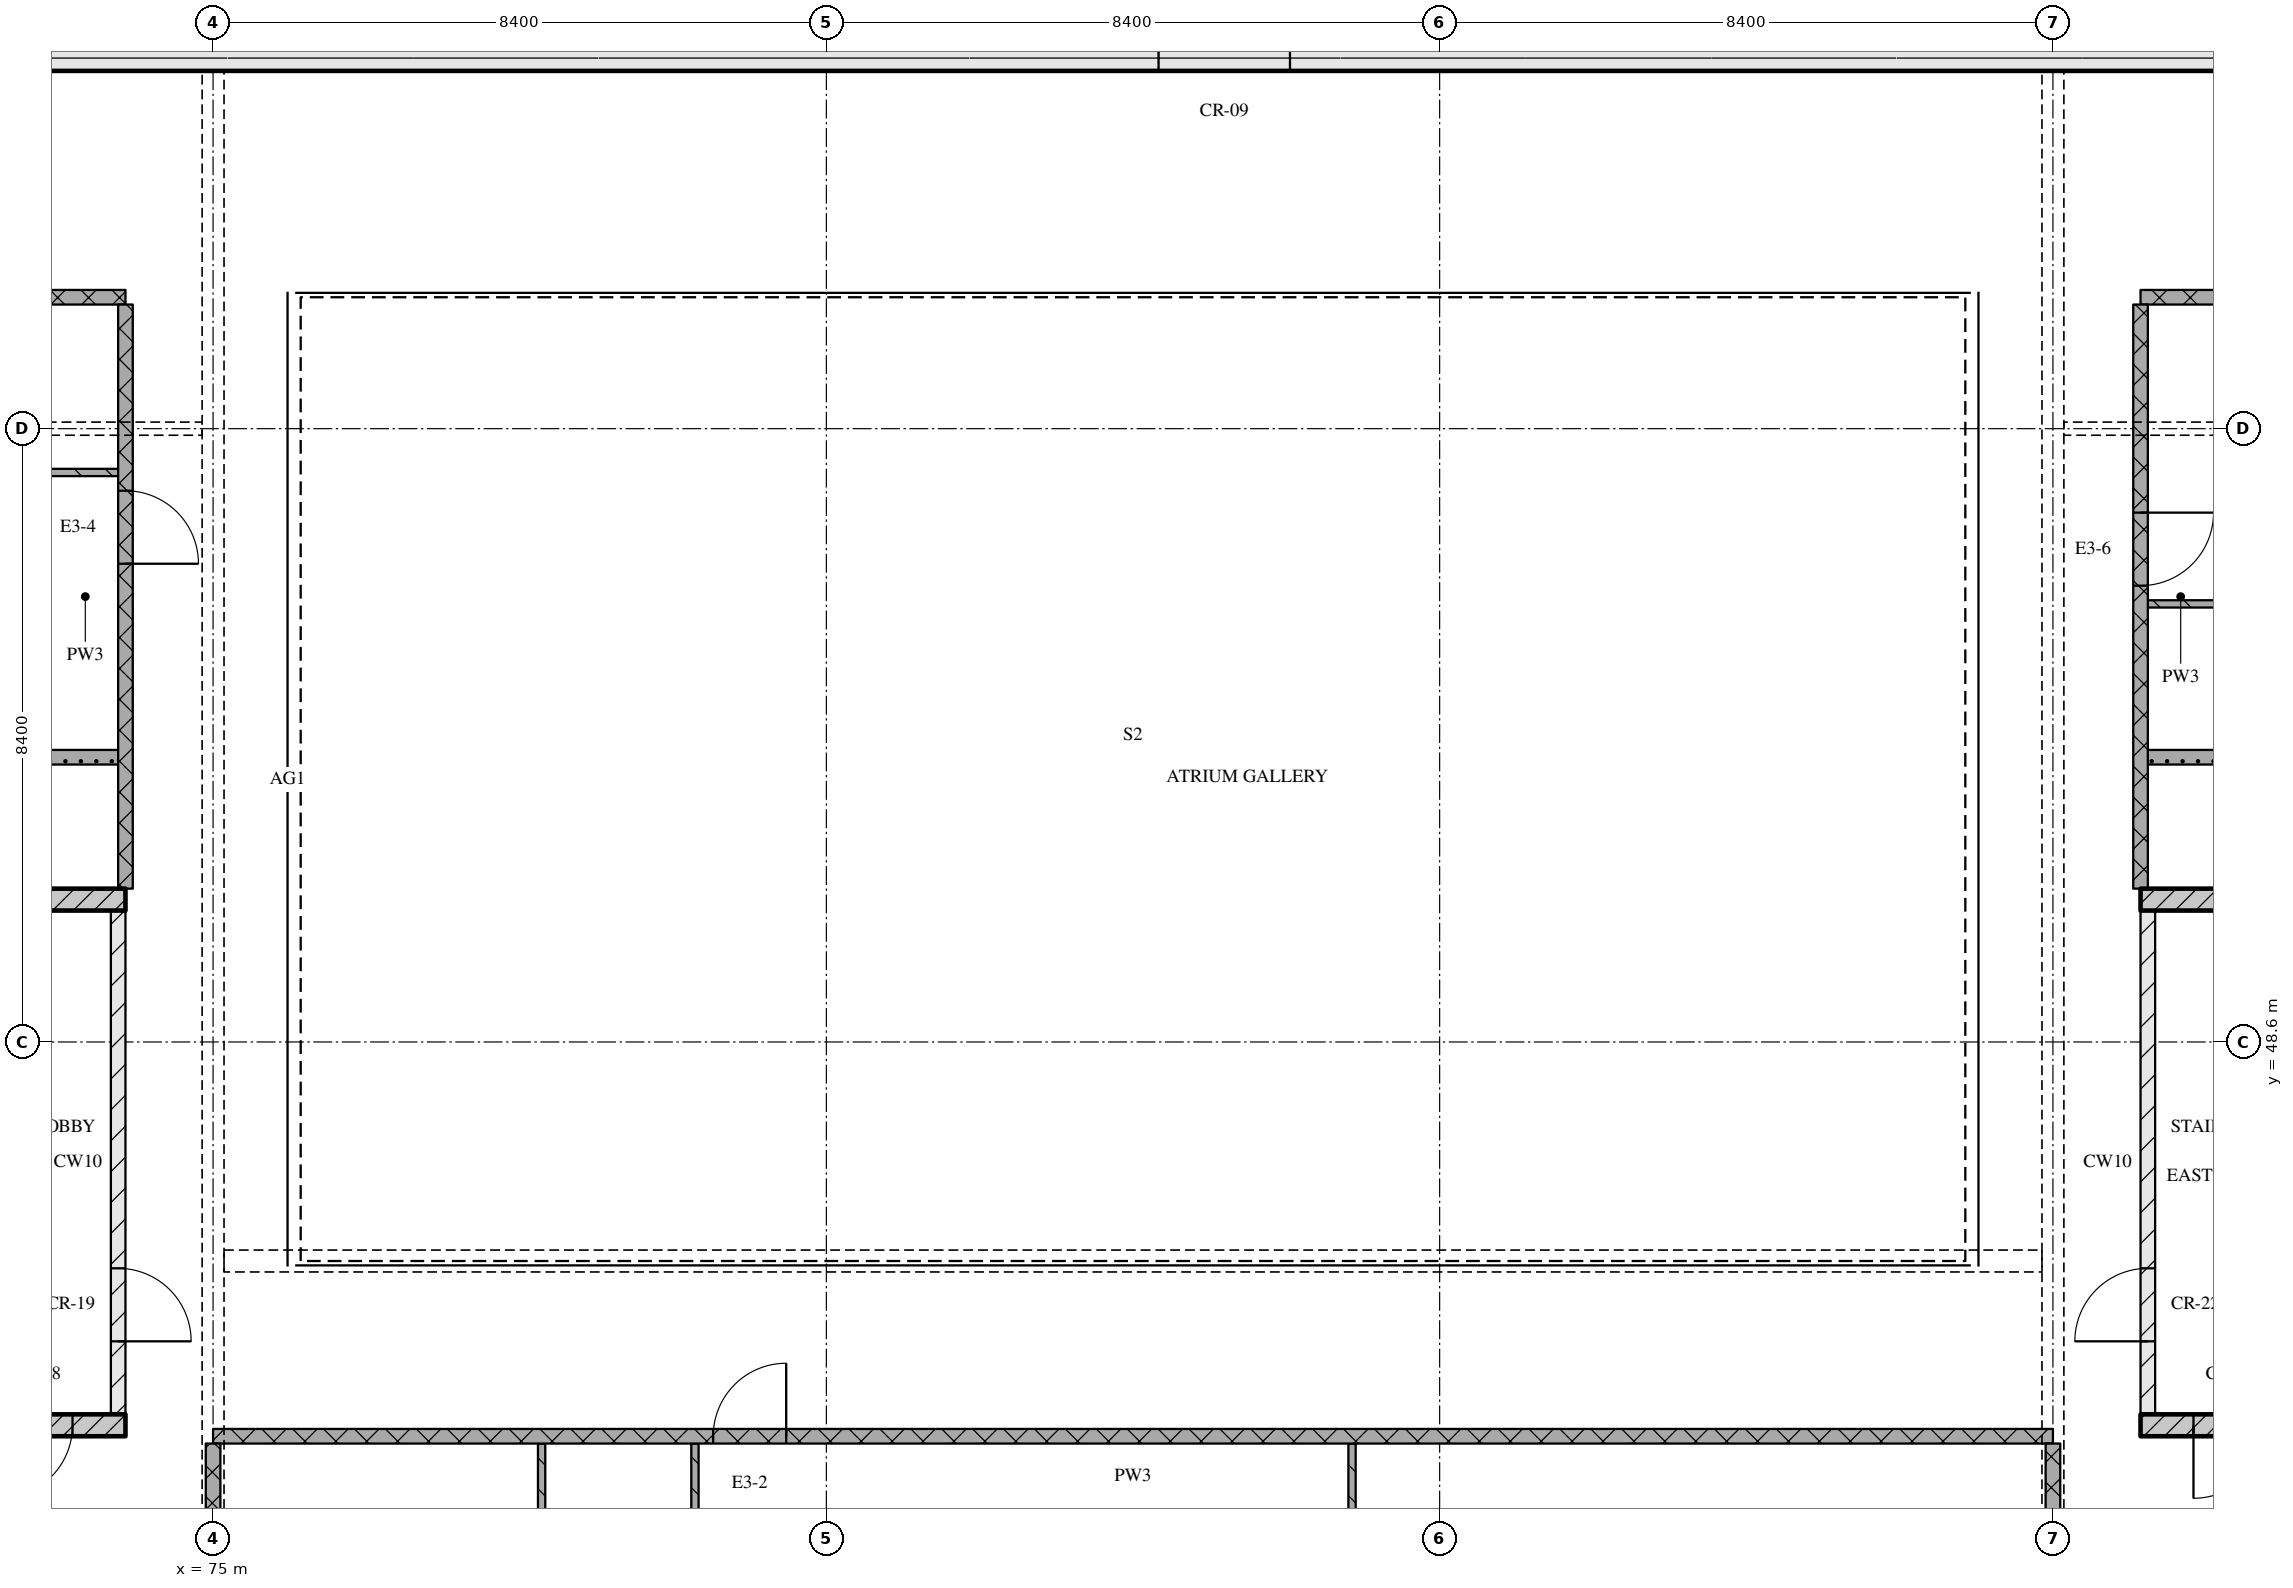
"""IFC4 building model, lengths in metres.
Left out: names, types, materials, properties, quantities, classifications, styles, units other than length and angle.
Written with IfcOpenShell. Run it as: python <this file> out.ifc"""

import sys

from ifc_helpers import new_model, si_unit, direction, frame, frame_2d, origin, place, context, subcontext, project, spatial, rectangle, extrude, element, fill, save


model = new_model("IFC4")
c1 = context("Model", 3, precision=1e-05, world=origin(), true_north=direction((0.0, 1.0)))
c2 = subcontext(c1, "Body", "Model", "MODEL_VIEW")
j1 = project(units=[si_unit("LENGTHUNIT", "METRE"), si_unit("PLANEANGLEUNIT", "RADIAN")], contexts=[c1])
p1 = place(None, origin())
s1 = spatial("IfcSite", under=j1, at=p1, CompositionType="ELEMENT")
p2 = place(p1, origin())
s2 = spatial("IfcBuilding", under=s1, at=p2, CompositionType="ELEMENT")
p3 = place(p2, frame((0.0, 0.0, 281.55)))
s3 = spatial("IfcBuildingStorey", under=s2, at=p3, CompositionType="ELEMENT", Elevation=281.55)
p4 = place(p3, frame((67.3, 62.15, 0.0), z_axis=(0.0, 0.0, 1.0), x_axis=(1.0, 0.0, 0.0)))
e1 = element("IfcWall", 1, at=p4, inside=s3, PredefinedType="SOLIDWALL", context=c2, shape_type="SweptSolid", body=[
    extrude(rectangle(XDim=40.6, YDim=0.5, at=frame_2d((20.3, 0.0))), origin(), (0.0, 0.0, 1.0), 3.32),
])
p5 = place(p4, frame((20.65, 0.0, 0.0)))
e2 = element("IfcOpeningElement", 2, at=p5, cuts=e1, PredefinedType="OPENING", context=c2, shape_type="SweptSolid", body=[
    extrude(rectangle(XDim=1.8, YDim=2.1, at=frame_2d((0.9, 1.05))), frame((0.0, 0.26, 0.0), z_axis=(0.0, -1.0, 0.0), x_axis=(1.0, 0.0, 0.0)), (0.0, 0.0, 1.0), 0.52),
])
p6 = place(p3, frame((68.2, 43.35, 0.0), z_axis=(0.0, 0.0, 1.0), x_axis=(1.0, 0.0, 0.0)))
e3 = element("IfcWall", 3, at=p6, inside=s3, PredefinedType="SOLIDWALL", context=c2, shape_type="SweptSolid", body=[
    extrude(rectangle(XDim=5.6, YDim=0.3, at=frame_2d((2.8, 0.0))), origin(), (0.0, 0.0, 1.0), 3.32),
])
p7 = place(p6, frame((3.875, 0.0, 0.0)))
e4 = element("IfcOpeningElement", 4, at=p7, cuts=e3, PredefinedType="OPENING", context=c2, shape_type="SweptSolid", body=[
    extrude(rectangle(XDim=1.0, YDim=2.1, at=frame_2d((0.5, 1.05))), frame((0.0, 0.16, 0.0), z_axis=(0.0, -1.0, 0.0), x_axis=(1.0, 0.0, 0.0)), (0.0, 0.0, 1.0), 0.32),
])
p8 = place(p3, frame((73.7, 43.5, 0.0), z_axis=(0.0, 0.0, 1.0), x_axis=(0.0, 1.0, 0.0)))
e5 = element("IfcWall", 5, at=p8, inside=s3, PredefinedType="PARTITIONING", context=c2, shape_type="SweptSolid", body=[
    extrude(rectangle(XDim=6.9, YDim=0.2, at=frame_2d((3.45, 0.0))), origin(), (0.0, 0.0, 1.0), 3.32),
])
p9 = place(p8, frame((1.0, 0.0, 0.0)))
e6 = element("IfcOpeningElement", 6, at=p9, cuts=e5, PredefinedType="OPENING", context=c2, shape_type="SweptSolid", body=[
    extrude(rectangle(XDim=1.0, YDim=2.1, at=frame_2d((0.5, 1.05))), frame((0.0, 0.11, 0.0), z_axis=(0.0, -1.0, 0.0), x_axis=(1.0, 0.0, 0.0)), (0.0, 0.0, 1.0), 0.22),
])
p10 = place(p3, frame((68.2, 50.55, 0.0), z_axis=(0.0, 0.0, 1.0), x_axis=(1.0, 0.0, 0.0)))
e7 = element("IfcWall", 7, at=p10, inside=s3, PredefinedType="SOLIDWALL", context=c2, shape_type="SweptSolid", body=[
    extrude(rectangle(XDim=5.6, YDim=0.3, at=frame_2d((2.8, 0.0))), origin(), (0.0, 0.0, 1.0), 3.32),
])
p11 = place(p3, frame((101.4, 43.35, 0.0), z_axis=(0.0, 0.0, 1.0), x_axis=(1.0, 0.0, 0.0)))
e8 = element("IfcWall", 8, at=p11, inside=s3, PredefinedType="SOLIDWALL", context=c2, shape_type="SweptSolid", body=[
    extrude(rectangle(XDim=5.6, YDim=0.3, at=frame_2d((2.8, 0.0))), origin(), (0.0, 0.0, 1.0), 3.32),
])
p12 = place(p11, frame((0.725, 0.0, 0.0)))
e9 = element("IfcOpeningElement", 9, at=p12, cuts=e8, PredefinedType="OPENING", context=c2, shape_type="SweptSolid", body=[
    extrude(rectangle(XDim=1.0, YDim=2.1, at=frame_2d((0.5, 1.05))), frame((0.0, 0.16, 0.0), z_axis=(0.0, -1.0, 0.0), x_axis=(1.0, 0.0, 0.0)), (0.0, 0.0, 1.0), 0.32),
])
p13 = place(p3, frame((101.5, 43.5, 0.0), z_axis=(0.0, 0.0, 1.0), x_axis=(0.0, 1.0, 0.0)))
e10 = element("IfcWall", 10, at=p13, inside=s3, PredefinedType="PARTITIONING", context=c2, shape_type="SweptSolid", body=[
    extrude(rectangle(XDim=6.9, YDim=0.2, at=frame_2d((3.45, 0.0))), origin(), (0.0, 0.0, 1.0), 3.32),
])
p14 = place(p13, frame((1.0, 0.0, 0.0)))
e11 = element("IfcOpeningElement", 11, at=p14, cuts=e10, PredefinedType="OPENING", context=c2, shape_type="SweptSolid", body=[
    extrude(rectangle(XDim=1.0, YDim=2.1, at=frame_2d((0.5, 1.05))), frame((0.0, 0.11, 0.0), z_axis=(0.0, -1.0, 0.0), x_axis=(1.0, 0.0, 0.0)), (0.0, 0.0, 1.0), 0.22),
])
p15 = place(p3, frame((101.4, 50.55, 0.0), z_axis=(0.0, 0.0, 1.0), x_axis=(1.0, 0.0, 0.0)))
e12 = element("IfcWall", 12, at=p15, inside=s3, PredefinedType="SOLIDWALL", context=c2, shape_type="SweptSolid", body=[
    extrude(rectangle(XDim=5.6, YDim=0.3, at=frame_2d((2.8, 0.0))), origin(), (0.0, 0.0, 1.0), 3.32),
])
p16 = place(p3, frame((100.2, 43.2, 0.0), z_axis=(0.0, 0.0, 1.0), x_axis=(-1.0, 0.0, 0.0)))
e13 = element("IfcWall", 13, at=p16, inside=s3, PredefinedType="PARTITIONING", context=c2, shape_type="SweptSolid", body=[
    extrude(rectangle(XDim=25.2, YDim=0.2, at=frame_2d((12.6, 0.0))), origin(), (0.0, 0.0, 1.0), 3.32),
])
p17 = place(p16, frame((17.35, 0.0, 0.0)))
e14 = element("IfcOpeningElement", 14, at=p17, cuts=e13, PredefinedType="OPENING", context=c2, shape_type="SweptSolid", body=[
    extrude(rectangle(XDim=1.0, YDim=2.1, at=frame_2d((0.5, 1.05))), frame((0.0, 0.11, 0.0), z_axis=(0.0, -1.0, 0.0), x_axis=(1.0, 0.0, 0.0)), (0.0, 0.0, 1.0), 0.22),
])
for number, where, z_axis, x_axis in (
    (15, (56.68, 52.5, 0.0), (0.0, 0.0, 1.0), (1.0, 0.0, 0.0)),
    (16, (101.5, 52.5, 0.0), (0.0, 0.0, 1.0), (1.0, 0.0, 0.0)),
):
    element("IfcWall", number, at=place(p3, frame(where, z_axis=z_axis, x_axis=x_axis)), inside=s3, PredefinedType="PARTITIONING", context=c2, shape_type="SweptSolid", body=[
        extrude(rectangle(XDim=17.02, YDim=0.2, at=frame_2d((8.51, 0.0))), origin(), (0.0, 0.0, 1.0), 3.32),
    ])
for number, where, z_axis, x_axis in (
    (17, (101.5, 54.6, 0.0), (0.0, 0.0, 1.0), (1.0, 0.0, 0.0)),
    (18, (65.7, 56.4, 0.0), (0.0, 0.0, 1.0), (1.0, 0.0, 0.0)),
):
    element("IfcWall", number, at=place(p3, frame(where, z_axis=z_axis, x_axis=x_axis)), inside=s3, PredefinedType="PARTITIONING", context=c2, shape_type="SweptSolid", body=[
        extrude(rectangle(XDim=8.0, YDim=0.1, at=frame_2d((4.0, 0.0))), origin(), (0.0, 0.0, 1.0), 3.32),
    ])
for number, where, z_axis, x_axis in (
    (19, (64.2, 58.8, 0.0), (0.0, 0.0, 1.0), (1.0, 0.0, 0.0)),
    (20, (101.4, 58.8, 0.0), (0.0, 0.0, 1.0), (1.0, 0.0, 0.0)),
):
    element("IfcWall", number, at=place(p3, frame(where, z_axis=z_axis, x_axis=x_axis)), inside=s3, PredefinedType="PARTITIONING", context=c2, shape_type="SweptSolid", body=[
        extrude(rectangle(XDim=9.6, YDim=0.2, at=frame_2d((4.8, 0.0))), origin(), (0.0, 0.0, 1.0), 3.32),
    ])
p18 = place(p3, frame((73.8, 50.7, 0.0), z_axis=(0.0, 0.0, 1.0), x_axis=(0.0, 1.0, 0.0)))
e21 = element("IfcWall", 21, at=p18, inside=s3, PredefinedType="PARTITIONING", context=c2, shape_type="SweptSolid", body=[
    extrude(rectangle(XDim=8.0, YDim=0.2, at=frame_2d((4.0, 0.0))), origin(), (0.0, 0.0, 1.0), 3.32),
])
p19 = place(p18, frame((4.45, 0.0, 0.0)))
e22 = element("IfcOpeningElement", 22, at=p19, cuts=e21, PredefinedType="OPENING", context=c2, shape_type="SweptSolid", body=[
    extrude(rectangle(XDim=1.0, YDim=2.1, at=frame_2d((0.5, 1.05))), frame((0.0, 0.11, 0.0), z_axis=(0.0, -1.0, 0.0), x_axis=(1.0, 0.0, 0.0)), (0.0, 0.0, 1.0), 0.22),
])
p20 = place(p3, frame((75.0, 43.1, 0.0), z_axis=(0.0, 0.0, 1.0), x_axis=(0.0, -1.0, 0.0)))
e23 = element("IfcWall", 23, at=p20, inside=s3, PredefinedType="PARTITIONING", context=c2, shape_type="SweptSolid", body=[
    extrude(rectangle(XDim=2.2, YDim=0.2, at=frame_2d((1.1, 0.0))), origin(), (0.0, 0.0, 1.0), 2.53),
])
p21 = place(p3, frame((79.5, 43.1, 0.0), z_axis=(0.0, 0.0, 1.0), x_axis=(0.0, -1.0, 0.0)))
e24 = element("IfcWall", 24, at=p21, inside=s3, PredefinedType="PARTITIONING", context=c2, shape_type="SweptSolid", body=[
    extrude(rectangle(XDim=4.95, YDim=0.1, at=frame_2d((2.475, 0.0))), origin(), (0.0, 0.0, 1.0), 3.32),
])
p22 = place(p3, frame((81.6, 38.15, 0.0), z_axis=(0.0, 0.0, 1.0), x_axis=(0.0, 1.0, 0.0)))
e25 = element("IfcWall", 25, at=p22, inside=s3, PredefinedType="PARTITIONING", context=c2, shape_type="SweptSolid", body=[
    extrude(rectangle(XDim=4.95, YDim=0.1, at=frame_2d((2.475, 0.0))), origin(), (0.0, 0.0, 1.0), 3.32),
])
p23 = place(p22, frame((2.1, 0.0, 0.0)))
e26 = element("IfcOpeningElement", 26, at=p23, cuts=e25, PredefinedType="OPENING", context=c2, shape_type="SweptSolid", body=[
    extrude(rectangle(XDim=0.8, YDim=2.1, at=frame_2d((0.4, 1.05))), frame((0.0, 0.06, 0.0), z_axis=(0.0, -1.0, 0.0), x_axis=(1.0, 0.0, 0.0)), (0.0, 0.0, 1.0), 0.12),
])
p24 = place(p3, frame((90.6, 43.1, 0.0), z_axis=(0.0, 0.0, 1.0), x_axis=(0.0, -1.0, 0.0)))
e27 = element("IfcWall", 27, at=p24, inside=s3, PredefinedType="PARTITIONING", context=c2, shape_type="SweptSolid", body=[
    extrude(rectangle(XDim=4.95, YDim=0.1, at=frame_2d((2.475, 0.0))), origin(), (0.0, 0.0, 1.0), 3.32),
])
p25 = place(p3, frame((100.2, 43.1, 0.0), z_axis=(0.0, 0.0, 1.0), x_axis=(0.0, -1.0, 0.0)))
e28 = element("IfcWall", 28, at=p25, inside=s3, PredefinedType="PARTITIONING", context=c2, shape_type="SweptSolid", body=[
    extrude(rectangle(XDim=2.2, YDim=0.2, at=frame_2d((1.1, 0.0))), origin(), (0.0, 0.0, 1.0), 2.53),
])
p26 = place(p3, frame((101.4, 58.7, 0.0), z_axis=(0.0, 0.0, 1.0), x_axis=(0.0, -1.0, 0.0)))
e29 = element("IfcWall", 29, at=p26, inside=s3, PredefinedType="PARTITIONING", context=c2, shape_type="SweptSolid", body=[
    extrude(rectangle(XDim=8.0, YDim=0.2, at=frame_2d((4.0, 0.0))), origin(), (0.0, 0.0, 1.0), 3.32),
])
p27 = place(p26, frame((2.85, 0.0, 0.0)))
e30 = element("IfcOpeningElement", 30, at=p27, cuts=e29, PredefinedType="OPENING", context=c2, shape_type="SweptSolid", body=[
    extrude(rectangle(XDim=1.0, YDim=2.1, at=frame_2d((0.5, 1.05))), frame((0.0, 0.11, 0.0), z_axis=(0.0, -1.0, 0.0), x_axis=(1.0, 0.0, 0.0)), (0.0, 0.0, 1.0), 0.22),
])
p28 = place(p5, origin())
e31 = element("IfcDoor", 31, at=p28, inside=s3, OperationType="DOUBLE_DOOR_SINGLE_SWING", PredefinedType="DOOR", context=c2, shape_type="SweptSolid", body=[
    extrude(rectangle(XDim=1.8, YDim=2.1, at=frame_2d((0.9, 1.05))), frame((0.0, 0.025, 0.0), z_axis=(0.0, -1.0, 0.0), x_axis=(1.0, 0.0, 0.0)), (0.0, 0.0, 1.0), 0.05),
])
fill(e2, e31)
p29 = place(p7, origin())
e32 = element("IfcDoor", 32, at=p29, inside=s3, OperationType="SINGLE_SWING_RIGHT", PredefinedType="DOOR", context=c2, shape_type="SweptSolid", body=[
    extrude(rectangle(XDim=1.0, YDim=2.1, at=frame_2d((0.5, 1.05))), frame((0.0, 0.025, 0.0), z_axis=(0.0, -1.0, 0.0), x_axis=(1.0, 0.0, 0.0)), (0.0, 0.0, 1.0), 0.05),
])
fill(e4, e32)
p30 = place(p9, origin())
e33 = element("IfcDoor", 33, at=p30, inside=s3, OperationType="SINGLE_SWING_RIGHT", PredefinedType="DOOR", context=c2, shape_type="SweptSolid", body=[
    extrude(rectangle(XDim=1.0, YDim=2.1, at=frame_2d((0.5, 1.05))), frame((0.0, 0.025, 0.0), z_axis=(0.0, -1.0, 0.0), x_axis=(1.0, 0.0, 0.0)), (0.0, 0.0, 1.0), 0.05),
])
fill(e6, e33)
p31 = place(p12, origin())
e34 = element("IfcDoor", 34, at=p31, inside=s3, OperationType="SINGLE_SWING_RIGHT", PredefinedType="DOOR", context=c2, shape_type="SweptSolid", body=[
    extrude(rectangle(XDim=1.0, YDim=2.1, at=frame_2d((0.5, 1.05))), frame((0.0, 0.025, 0.0), z_axis=(0.0, -1.0, 0.0), x_axis=(1.0, 0.0, 0.0)), (0.0, 0.0, 1.0), 0.05),
])
fill(e9, e34)
p32 = place(p14, origin())
e35 = element("IfcDoor", 35, at=p32, inside=s3, OperationType="SINGLE_SWING_LEFT", PredefinedType="DOOR", context=c2, shape_type="SweptSolid", body=[
    extrude(rectangle(XDim=1.0, YDim=2.1, at=frame_2d((0.5, 1.05))), frame((0.0, 0.025, 0.0), z_axis=(0.0, -1.0, 0.0), x_axis=(1.0, 0.0, 0.0)), (0.0, 0.0, 1.0), 0.05),
])
fill(e11, e35)
p33 = place(p17, origin())
e36 = element("IfcDoor", 36, at=p33, inside=s3, OperationType="SINGLE_SWING_RIGHT", PredefinedType="DOOR", context=c2, shape_type="SweptSolid", body=[
    extrude(rectangle(XDim=1.0, YDim=2.1, at=frame_2d((0.5, 1.05))), frame((0.0, 0.025, 0.0), z_axis=(0.0, -1.0, 0.0), x_axis=(1.0, 0.0, 0.0)), (0.0, 0.0, 1.0), 0.05),
])
fill(e14, e36)
p34 = place(p19, origin())
e37 = element("IfcDoor", 37, at=p34, inside=s3, OperationType="SINGLE_SWING_RIGHT", PredefinedType="DOOR", context=c2, shape_type="SweptSolid", body=[
    extrude(rectangle(XDim=1.0, YDim=2.1, at=frame_2d((0.5, 1.05))), frame((0.0, 0.025, 0.0), z_axis=(0.0, -1.0, 0.0), x_axis=(1.0, 0.0, 0.0)), (0.0, 0.0, 1.0), 0.05),
])
fill(e22, e37)
p35 = place(p27, origin())
e38 = element("IfcDoor", 38, at=p35, inside=s3, OperationType="SINGLE_SWING_LEFT", PredefinedType="DOOR", context=c2, shape_type="SweptSolid", body=[
    extrude(rectangle(XDim=1.0, YDim=2.1, at=frame_2d((0.5, 1.05))), frame((0.0, 0.025, 0.0), z_axis=(0.0, -1.0, 0.0), x_axis=(1.0, 0.0, 0.0)), (0.0, 0.0, 1.0), 0.05),
])
fill(e30, e38)
save(model, sys.argv[1])
